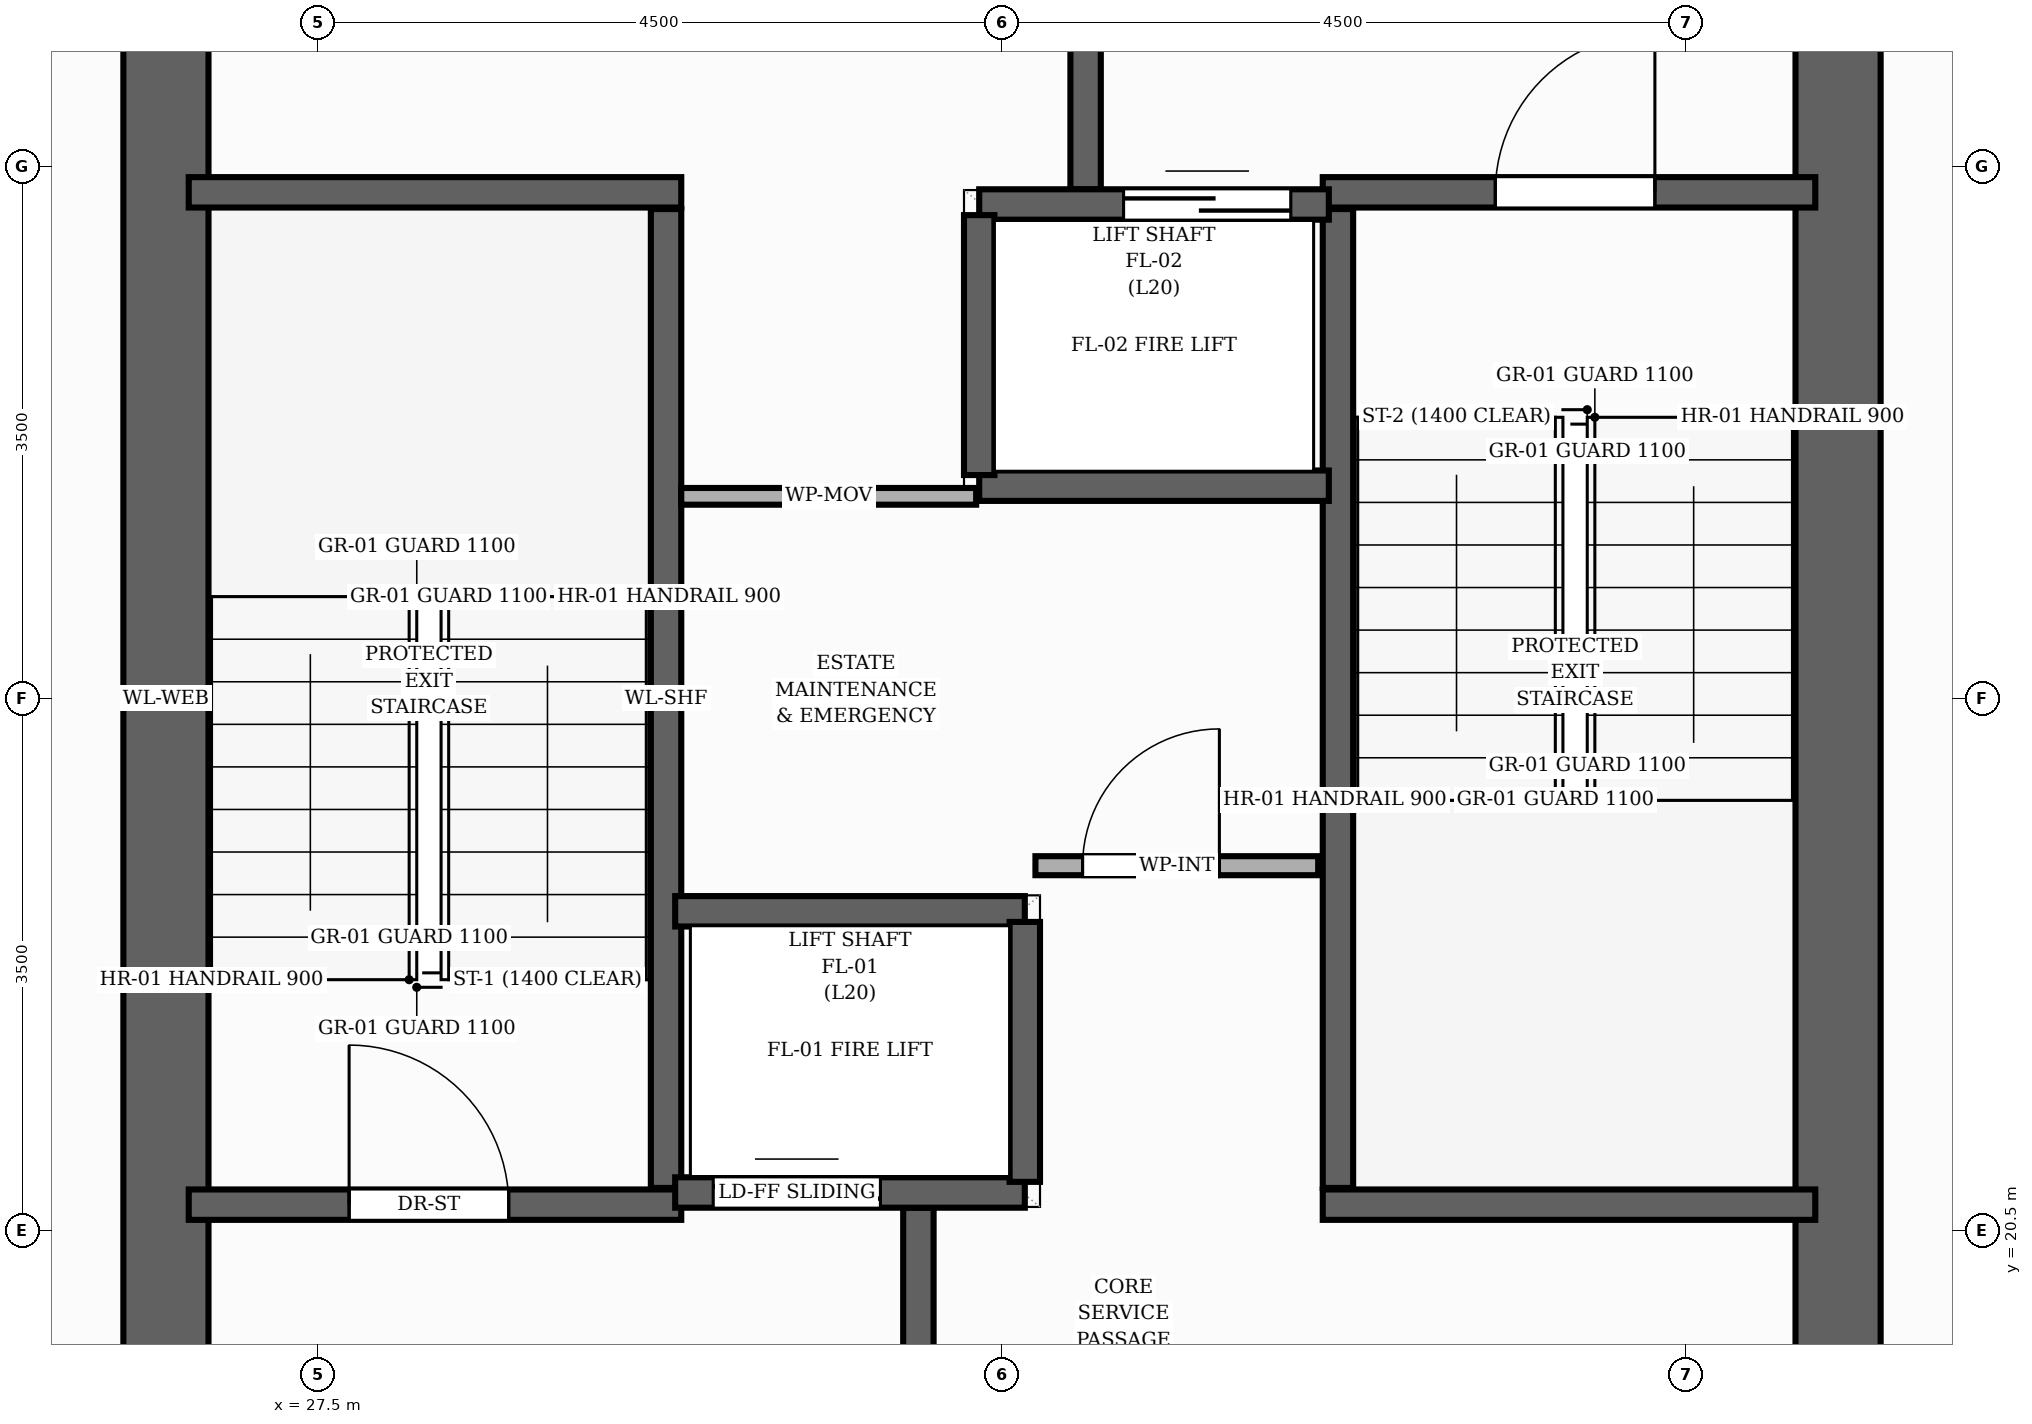
"""IFC4 building model, lengths in metres.
Left out: names, types, materials, properties, quantities, classifications, styles, units other than length and angle.
Written with IfcOpenShell. Run it as: python <this file> out.ifc"""

import sys

from ifc_helpers import new_model, si_unit, direction, frame, frame_2d, origin, place, context, subcontext, project, spatial, rectangle, extrude, element, fill, save


model = new_model("IFC4")
c1 = context("Model", 3, precision=1e-05, world=origin(), true_north=direction((0.0, 1.0)))
c2 = subcontext(c1, "Body", "Model", "MODEL_VIEW")
j1 = project(units=[si_unit("LENGTHUNIT", "METRE"), si_unit("PLANEANGLEUNIT", "RADIAN")], contexts=[c1])
p1 = place(None, origin())
s1 = spatial("IfcSite", under=j1, at=p1, CompositionType="ELEMENT")
p2 = place(p1, origin())
s2 = spatial("IfcBuilding", under=s1, at=p2, CompositionType="ELEMENT")
p3 = place(p2, frame((0.0, 0.0, 70.88)))
s3 = spatial("IfcBuildingStorey", under=s2, at=p3, CompositionType="ELEMENT", Elevation=70.88)
for number, where, z_axis, x_axis in (
    (1, (26.5, 17.35, 0.0), (0.0, 0.0, 1.0), (0.0, 1.0, 0.0)),
    (2, (37.5, 17.35, 0.0), (0.0, 0.0, 1.0), (0.0, 1.0, 0.0)),
):
    element("IfcWall", number, at=place(p3, frame(where, z_axis=z_axis, x_axis=x_axis)), inside=s3, PredefinedType="SHEAR", context=c2, shape_type="SweptSolid", body=[
        extrude(rectangle(XDim=13.3, YDim=0.56, at=frame_2d((6.65, 0.0))), origin(), (0.0, 0.0, 1.0), 3.2),
    ])
p4 = place(p3, frame((29.79, 20.78, 0.0), z_axis=(0.0, 0.0, 1.0), x_axis=(0.0, 1.0, 0.0)))
e3 = element("IfcWall", 3, at=p4, inside=s3, PredefinedType="SHEAR", context=c2, shape_type="SweptSolid", body=[
    extrude(rectangle(XDim=6.44, YDim=0.2, at=frame_2d((3.22, 0.0))), origin(), (0.0, 0.0, 1.0), 3.2),
])
p5 = place(p3, frame((26.65, 27.33, 0.0), z_axis=(0.0, 0.0, 1.0), x_axis=(1.0, 0.0, 0.0)))
e4 = element("IfcWall", 4, at=p5, inside=s3, PredefinedType="SHEAR", context=c2, shape_type="SweptSolid", body=[
    extrude(rectangle(XDim=3.24, YDim=0.2, at=frame_2d((1.62, 0.0))), origin(), (0.0, 0.0, 1.0), 3.2),
])
p6 = place(p3, frame((26.65, 20.67, 0.0), z_axis=(0.0, 0.0, 1.0), x_axis=(1.0, 0.0, 0.0)))
e5 = element("IfcWall", 5, at=p6, inside=s3, PredefinedType="SHEAR", context=c2, shape_type="SweptSolid", body=[
    extrude(rectangle(XDim=3.24, YDim=0.2, at=frame_2d((1.62, 0.0))), origin(), (0.0, 0.0, 1.0), 3.2),
])
p7 = place(p6, frame((1.055, 0.0, 0.0)))
e6 = element("IfcOpeningElement", 6, at=p7, cuts=e5, PredefinedType="OPENING", context=c2, shape_type="SweptSolid", body=[
    extrude(rectangle(XDim=1.05, YDim=2.15, at=frame_2d((0.525, 1.075))), frame((0.0, 0.11, 0.0), z_axis=(0.0, -1.0, 0.0), x_axis=(1.0, 0.0, 0.0)), (0.0, 0.0, 1.0), 0.22),
])
p8 = place(p3, frame((34.21, 20.78, 0.0), z_axis=(0.0, 0.0, 1.0), x_axis=(0.0, 1.0, 0.0)))
e7 = element("IfcWall", 7, at=p8, inside=s3, PredefinedType="SHEAR", context=c2, shape_type="SweptSolid", body=[
    extrude(rectangle(XDim=6.44, YDim=0.2, at=frame_2d((3.22, 0.0))), origin(), (0.0, 0.0, 1.0), 3.2),
])
p9 = place(p3, frame((34.11, 20.67, 0.0), z_axis=(0.0, 0.0, 1.0), x_axis=(1.0, 0.0, 0.0)))
e8 = element("IfcWall", 8, at=p9, inside=s3, PredefinedType="SHEAR", context=c2, shape_type="SweptSolid", body=[
    extrude(rectangle(XDim=3.24, YDim=0.2, at=frame_2d((1.62, 0.0))), origin(), (0.0, 0.0, 1.0), 3.2),
])
p10 = place(p3, frame((34.11, 27.33, 0.0), z_axis=(0.0, 0.0, 1.0), x_axis=(1.0, 0.0, 0.0)))
e9 = element("IfcWall", 9, at=p10, inside=s3, PredefinedType="SHEAR", context=c2, shape_type="SweptSolid", body=[
    extrude(rectangle(XDim=3.24, YDim=0.2, at=frame_2d((1.62, 0.0))), origin(), (0.0, 0.0, 1.0), 3.2),
])
p11 = place(p10, frame((1.135, 0.0, 0.0)))
e10 = element("IfcOpeningElement", 10, at=p11, cuts=e9, PredefinedType="OPENING", context=c2, shape_type="SweptSolid", body=[
    extrude(rectangle(XDim=1.05, YDim=2.15, at=frame_2d((0.525, 1.075))), frame((0.0, 0.11, 0.0), z_axis=(0.0, -1.0, 0.0), x_axis=(1.0, 0.0, 0.0)), (0.0, 0.0, 1.0), 0.22),
])
for number, where, z_axis, x_axis in (
    (11, (31.45, 17.15, 0.0), (0.0, 0.0, 1.0), (0.0, 1.0, 0.0)),
    (12, (32.55, 27.35, 0.0), (0.0, 0.0, 1.0), (0.0, 1.0, 0.0)),
):
    element("IfcWall", number, at=place(p3, frame(where, z_axis=z_axis, x_axis=x_axis)), inside=s3, PredefinedType="SHEAR", context=c2, shape_type="SweptSolid", body=[
        extrude(rectangle(XDim=3.5, YDim=0.2, at=frame_2d((1.75, 0.0))), origin(), (0.0, 0.0, 1.0), 3.2),
    ])
p12 = place(p3, frame((29.85, 20.75, 0.0), z_axis=(0.0, 0.0, 1.0), x_axis=(1.0, 0.0, 0.0)))
e13 = element("IfcWall", 13, at=p12, inside=s3, PredefinedType="SHEAR", context=c2, shape_type="SweptSolid", body=[
    extrude(rectangle(XDim=2.3, YDim=0.2, at=frame_2d((1.15, 0.0))), origin(), (0.0, 0.0, 1.0), 3.2),
])
p13 = place(p12, frame((0.25, 0.0, 0.0)))
e14 = element("IfcOpeningElement", 14, at=p13, cuts=e13, PredefinedType="OPENING", context=c2, shape_type="SweptSolid", body=[
    extrude(rectangle(XDim=1.1, YDim=2.15, at=frame_2d((0.55, 1.075))), frame((0.0, 0.11, 0.0), z_axis=(0.0, -1.0, 0.0), x_axis=(1.0, 0.0, 0.0)), (0.0, 0.0, 1.0), 0.22),
])
p14 = place(p3, frame((29.85, 22.6, 0.0), z_axis=(0.0, 0.0, 1.0), x_axis=(1.0, 0.0, 0.0)))
e15 = element("IfcWall", 15, at=p14, inside=s3, PredefinedType="SHEAR", context=c2, shape_type="SweptSolid", body=[
    extrude(rectangle(XDim=2.3, YDim=0.2, at=frame_2d((1.15, 0.0))), origin(), (0.0, 0.0, 1.0), 3.2),
])
p15 = place(p3, frame((32.15, 20.82, 0.0), z_axis=(0.0, 0.0, 1.0), x_axis=(0.0, 1.0, 0.0)))
e16 = element("IfcWall", 16, at=p15, inside=s3, PredefinedType="SHEAR", context=c2, shape_type="SweptSolid", body=[
    extrude(rectangle(XDim=1.71, YDim=0.2, at=frame_2d((0.855, 0.0))), origin(), (0.0, 0.0, 1.0), 3.2),
])
p16 = place(p3, frame((31.85, 27.25, 0.0), z_axis=(0.0, 0.0, 1.0), x_axis=(1.0, 0.0, 0.0)))
e17 = element("IfcWall", 17, at=p16, inside=s3, PredefinedType="SHEAR", context=c2, shape_type="SweptSolid", body=[
    extrude(rectangle(XDim=2.3, YDim=0.2, at=frame_2d((1.15, 0.0))), origin(), (0.0, 0.0, 1.0), 3.2),
])
p17 = place(p16, frame((0.95, 0.0, 0.0)))
e18 = element("IfcOpeningElement", 18, at=p17, cuts=e17, PredefinedType="OPENING", context=c2, shape_type="SweptSolid", body=[
    extrude(rectangle(XDim=1.1, YDim=2.15, at=frame_2d((0.55, 1.075))), frame((0.0, 0.11, 0.0), z_axis=(0.0, -1.0, 0.0), x_axis=(1.0, 0.0, 0.0)), (0.0, 0.0, 1.0), 0.22),
])
p18 = place(p3, frame((31.85, 25.4, 0.0), z_axis=(0.0, 0.0, 1.0), x_axis=(1.0, 0.0, 0.0)))
e19 = element("IfcWall", 19, at=p18, inside=s3, PredefinedType="SHEAR", context=c2, shape_type="SweptSolid", body=[
    extrude(rectangle(XDim=2.3, YDim=0.2, at=frame_2d((1.15, 0.0))), origin(), (0.0, 0.0, 1.0), 3.2),
])
p19 = place(p3, frame((31.85, 25.47, 0.0), z_axis=(0.0, 0.0, 1.0), x_axis=(0.0, 1.0, 0.0)))
e20 = element("IfcWall", 20, at=p19, inside=s3, PredefinedType="SHEAR", context=c2, shape_type="SweptSolid", body=[
    extrude(rectangle(XDim=1.71, YDim=0.2, at=frame_2d((0.855, 0.0))), origin(), (0.0, 0.0, 1.0), 3.2),
])
p20 = place(p3, frame((32.22, 22.9, 0.0), z_axis=(0.0, 0.0, 1.0), x_axis=(1.0, 0.0, 0.0)))
e21 = element("IfcWall", 21, at=p20, inside=s3, PredefinedType="PARTITIONING", context=c2, shape_type="SweptSolid", body=[
    extrude(rectangle(XDim=1.86, YDim=0.125, at=frame_2d((0.93, 0.0))), origin(), (0.0, 0.0, 1.0), 2.955),
])
p21 = place(p20, frame((0.31, 0.0, 0.0)))
e22 = element("IfcOpeningElement", 22, at=p21, cuts=e21, PredefinedType="OPENING", context=c2, shape_type="SweptSolid", body=[
    extrude(rectangle(XDim=0.9, YDim=2.1, at=frame_2d((0.45, 1.05))), frame((0.0, 0.073, 0.0), z_axis=(0.0, -1.0, 0.0), x_axis=(1.0, 0.0, 0.0)), (0.0, 0.0, 1.0), 0.145),
])
p22 = place(p3, frame((29.89, 25.33, 0.0), z_axis=(0.0, 0.0, 1.0), x_axis=(1.0, 0.0, 0.0)))
e23 = element("IfcWall", 23, at=p22, inside=s3, PredefinedType="MOVABLE", context=c2, shape_type="SweptSolid", body=[
    extrude(rectangle(XDim=1.94, YDim=0.11, at=frame_2d((0.97, 0.0))), origin(), (0.0, 0.0, 1.0), 2.955),
])
p23 = place(p7, origin())
e24 = element("IfcDoor", 24, at=p23, inside=s3, OperationType="SINGLE_SWING_LEFT", PredefinedType="DOOR", context=c2, shape_type="SweptSolid", body=[
    extrude(rectangle(XDim=1.05, YDim=2.15, at=frame_2d((0.525, 1.075))), frame((0.0, 0.025, 0.0), z_axis=(0.0, -1.0, 0.0), x_axis=(1.0, 0.0, 0.0)), (0.0, 0.0, 1.0), 0.05),
])
fill(e6, e24)
p24 = place(p11, origin())
e25 = element("IfcDoor", 25, at=p24, inside=s3, OperationType="SINGLE_SWING_RIGHT", PredefinedType="DOOR", context=c2, shape_type="SweptSolid", body=[
    extrude(rectangle(XDim=1.05, YDim=2.15, at=frame_2d((0.525, 1.075))), frame((0.0, 0.025, 0.0), z_axis=(0.0, -1.0, 0.0), x_axis=(1.0, 0.0, 0.0)), (0.0, 0.0, 1.0), 0.05),
])
fill(e10, e25)
p25 = place(p13, origin())
e26 = element("IfcDoor", 26, at=p25, inside=s3, OperationType="DOUBLE_DOOR_SLIDING", PredefinedType="DOOR", context=c2, shape_type="SweptSolid", body=[
    extrude(rectangle(XDim=1.1, YDim=2.15, at=frame_2d((0.55, 1.075))), frame((0.0, 0.025, 0.0), z_axis=(0.0, -1.0, 0.0), x_axis=(1.0, 0.0, 0.0)), (0.0, 0.0, 1.0), 0.05),
])
fill(e14, e26)
p26 = place(p17, origin())
e27 = element("IfcDoor", 27, at=p26, inside=s3, OperationType="DOUBLE_DOOR_SLIDING", PredefinedType="DOOR", context=c2, shape_type="SweptSolid", body=[
    extrude(rectangle(XDim=1.1, YDim=2.15, at=frame_2d((0.55, 1.075))), frame((0.0, 0.025, 0.0), z_axis=(0.0, -1.0, 0.0), x_axis=(1.0, 0.0, 0.0)), (0.0, 0.0, 1.0), 0.05),
])
fill(e18, e27)
p27 = place(p21, origin())
e28 = element("IfcDoor", 28, at=p27, inside=s3, OperationType="SINGLE_SWING_RIGHT", PredefinedType="DOOR", context=c2, shape_type="SweptSolid", body=[
    extrude(rectangle(XDim=0.9, YDim=2.1, at=frame_2d((0.45, 1.05))), frame((0.0, 0.025, 0.0), z_axis=(0.0, -1.0, 0.0), x_axis=(1.0, 0.0, 0.0)), (0.0, 0.0, 1.0), 0.05),
])
fill(e22, e28)
save(model, sys.argv[1])
